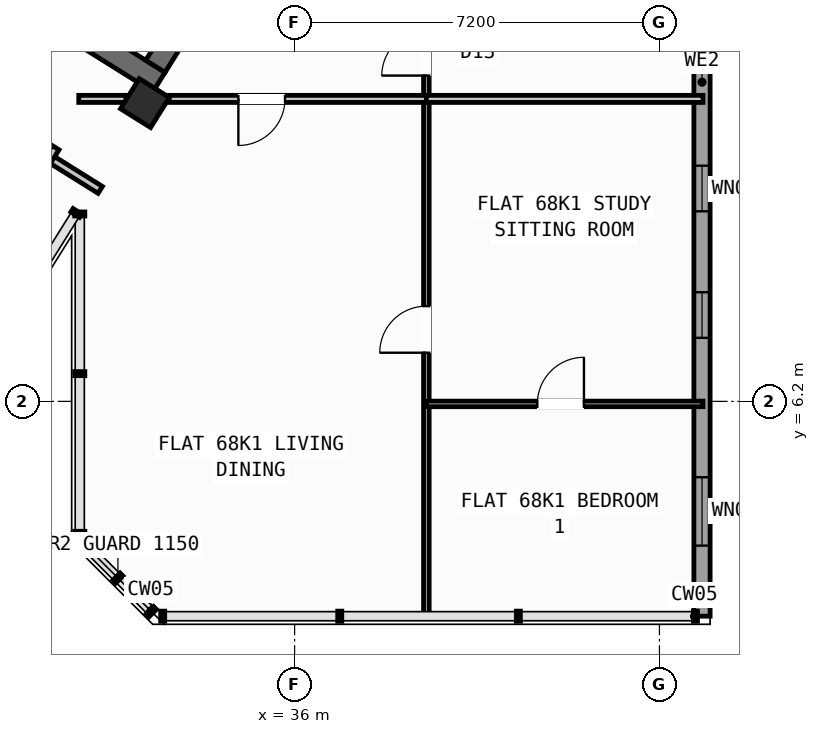
"""IFC4 building model, lengths in metres.
Left out: names, types, materials, properties, quantities, classifications, styles, units other than length and angle.
Written with IfcOpenShell. Run it as: python <this file> out.ifc"""

import sys

from ifc_helpers import new_model, si_unit, direction, frame, frame_2d, origin, origin_2d, place, context, subcontext, project, spatial, rectangle, hollow_rectangle, extrude, source, transform, mapped, element, fill, save


model = new_model("IFC4")
c1 = context("Model", 3, precision=1e-05, world=origin(), true_north=direction((0.0, 1.0)))
c2 = subcontext(c1, "Body", "Model", "MODEL_VIEW")
j1 = project(units=[si_unit("LENGTHUNIT", "METRE"), si_unit("PLANEANGLEUNIT", "RADIAN")], contexts=[c1])
p1 = place(None, origin())
s1 = spatial("IfcSite", under=j1, at=p1, CompositionType="ELEMENT")
p2 = place(p1, origin())
s2 = spatial("IfcBuilding", under=s1, at=p2, CompositionType="ELEMENT")
p3 = place(p2, frame((0.0, 0.0, 270.0)))
s3 = spatial("IfcBuildingStorey", under=s2, at=p3, CompositionType="ELEMENT", Elevation=270.0)
p4 = place(p3, frame((33.324, 12.503, 0.0), z_axis=(0.0, 0.0, 1.0), x_axis=(-0.848043529849, 0.529926571782, 0.0)))
e1 = element("IfcWall", 1, at=p4, inside=s3, PredefinedType="SHEAR", context=c2, shape_type="SweptSolid", body=[
    extrude(rectangle(XDim=13.04, YDim=0.45, at=frame_2d((6.52, 0.0))), origin(), (0.0, 0.0, 1.0), 3.35),
])
p5 = place(p3, frame((36.683, 18.304, 0.0), z_axis=(0.0, 0.0, 1.0), x_axis=(-0.529904039071, -0.848057609704, 0.0)))
e2 = element("IfcWall", 2, at=p5, inside=s3, PredefinedType="SHEAR", context=c2, shape_type="SweptSolid", body=[
    extrude(rectangle(XDim=6.475, YDim=0.45, at=frame_2d((3.238, 0.0))), origin(), (0.0, 0.0, 1.0), 3.35),
])
m1 = source(origin(), c2, "Body", "SweptSolid", [
    extrude(hollow_rectangle(XDim=0.7, YDim=0.7, WallThickness=0.028, at=origin_2d()), origin(), (0.0, 0.0, 1.0), 3.6),
])
p6 = place(p3, frame((33.046, 12.087, 0.0), z_axis=(0.0, 0.0, 1.0), x_axis=(-0.848048096156, 0.529919264233, 0.0)))
e3 = element("IfcColumn", 3, at=p6, inside=s3, PredefinedType="COLUMN", context=c2, shape_type="MappedRepresentation", body=[
    mapped(m1, transform((0.0, 0.0, 0.0), scale=1.0)),
])
p7 = place(p3, frame((44.04, 23.04, 0.0), z_axis=(0.0, 0.0, 1.0), x_axis=(0.0, -1.0, 0.0)))
e4 = element("IfcWall", 4, at=p7, inside=s3, PredefinedType="STANDARD", context=c2, shape_type="SweptSolid", body=[
    extrude(rectangle(XDim=21.08, YDim=0.32, at=frame_2d((10.54, 0.0))), origin(), (0.0, 0.0, 1.0), 3.35),
])
p8 = place(p7, frame((1.285, 0.0, 0.9)))
e5 = element("IfcOpeningElement", 5, at=p8, cuts=e4, PredefinedType="OPENING", context=c2, shape_type="SweptSolid", body=[
    extrude(rectangle(XDim=1.65, YDim=1.45, at=frame_2d((0.825, 0.725))), frame((0.0, 0.17, 0.0), z_axis=(0.0, -1.0, 0.0), x_axis=(1.0, 0.0, 0.0)), (0.0, 0.0, 1.0), 0.34),
])
p9 = place(p7, frame((4.605, 0.0, 0.9)))
e6 = element("IfcOpeningElement", 6, at=p9, cuts=e4, PredefinedType="OPENING", context=c2, shape_type="SweptSolid", body=[
    extrude(rectangle(XDim=1.65, YDim=1.45, at=frame_2d((0.825, 0.725))), frame((0.0, 0.17, 0.0), z_axis=(0.0, -1.0, 0.0), x_axis=(1.0, 0.0, 0.0)), (0.0, 0.0, 1.0), 0.34),
])
p10 = place(p7, frame((8.8, 0.0, 1.0)))
e7 = element("IfcOpeningElement", 7, at=p10, cuts=e4, PredefinedType="OPENING", context=c2, shape_type="SweptSolid", body=[
    extrude(rectangle(XDim=0.9, YDim=1.25, at=frame_2d((0.45, 0.625))), frame((0.0, 0.17, 0.0), z_axis=(0.0, -1.0, 0.0), x_axis=(1.0, 0.0, 0.0)), (0.0, 0.0, 1.0), 0.34),
])
p11 = place(p7, frame((12.189, 0.0, 1.0)))
e8 = element("IfcOpeningElement", 8, at=p11, cuts=e4, PredefinedType="OPENING", context=c2, shape_type="SweptSolid", body=[
    extrude(rectangle(XDim=0.9, YDim=1.25, at=frame_2d((0.45, 0.625))), frame((0.0, 0.17, 0.0), z_axis=(0.0, -1.0, 0.0), x_axis=(1.0, 0.0, 0.0)), (0.0, 0.0, 1.0), 0.34),
])
p12 = place(p7, frame((14.686, 0.0, 1.0)))
e9 = element("IfcOpeningElement", 9, at=p12, cuts=e4, PredefinedType="OPENING", context=c2, shape_type="SweptSolid", body=[
    extrude(rectangle(XDim=0.9, YDim=1.25, at=frame_2d((0.45, 0.625))), frame((0.0, 0.17, 0.0), z_axis=(0.0, -1.0, 0.0), x_axis=(1.0, 0.0, 0.0)), (0.0, 0.0, 1.0), 0.34),
])
p13 = place(p7, frame((18.337, 0.0, 0.9)))
e10 = element("IfcOpeningElement", 10, at=p13, cuts=e4, PredefinedType="OPENING", context=c2, shape_type="SweptSolid", body=[
    extrude(rectangle(XDim=1.35, YDim=1.45, at=frame_2d((0.675, 0.725))), frame((0.0, 0.17, 0.0), z_axis=(0.0, -1.0, 0.0), x_axis=(1.0, 0.0, 0.0)), (0.0, 0.0, 1.0), 0.34),
])
p14 = place(p3, frame((32.164, 10.374, 0.0), z_axis=(0.0, 0.0, 1.0), x_axis=(-0.848044107957, 0.529925646633, 0.0)))
e11 = element("IfcWall", 11, at=p14, inside=s3, PredefinedType="PARTITIONING", context=c2, shape_type="SweptSolid", body=[
    extrude(rectangle(XDim=15.57, YDim=0.16, at=frame_2d((7.785, 0.0))), origin(), (0.0, 0.0, 1.0), 3.34),
])
p15 = place(p14, frame((10.83, 0.0, 0.0)))
e12 = element("IfcOpeningElement", 12, at=p15, cuts=e11, PredefinedType="OPENING", context=c2, shape_type="SweptSolid", body=[
    extrude(rectangle(XDim=1.0, YDim=2.1, at=frame_2d((0.5, 1.05))), frame((0.0, 0.09, 0.0), z_axis=(0.0, -1.0, 0.0), x_axis=(1.0, 0.0, 0.0)), (0.0, 0.0, 1.0), 0.18),
])
p16 = place(p3, frame((31.282, 11.208, 0.0), z_axis=(0.0, 0.0, 1.0), x_axis=(-0.529938869374, -0.84803584519, 0.0)))
e13 = element("IfcWall", 13, at=p16, inside=s3, PredefinedType="PARTITIONING", context=c2, shape_type="SweptSolid", body=[
    extrude(rectangle(XDim=5.48, YDim=0.16, at=frame_2d((2.74, 0.0))), origin(), (0.0, 0.0, 1.0), 3.34),
])
p17 = place(p3, frame((38.6, 1.96, 0.0), z_axis=(0.0, 0.0, 1.0), x_axis=(0.0, 1.0, 0.0)))
e14 = element("IfcWall", 14, at=p17, inside=s3, PredefinedType="PARTITIONING", context=c2, shape_type="SweptSolid", body=[
    extrude(rectangle(XDim=13.46, YDim=0.11, at=frame_2d((6.73, 0.0))), origin(), (0.0, 0.0, 1.0), 3.34),
])
p18 = place(p17, frame((5.2, 0.0, 0.0)))
e15 = element("IfcOpeningElement", 15, at=p18, cuts=e14, PredefinedType="OPENING", context=c2, shape_type="SweptSolid", body=[
    extrude(rectangle(XDim=0.92, YDim=2.08, at=frame_2d((0.46, 1.04))), frame((0.0, 0.065, 0.0), z_axis=(0.0, -1.0, 0.0), x_axis=(1.0, 0.0, 0.0)), (0.0, 0.0, 1.0), 0.13),
])
p19 = place(p17, frame((10.67, 0.0, 0.0)))
e16 = element("IfcOpeningElement", 16, at=p19, cuts=e14, PredefinedType="OPENING", context=c2, shape_type="SweptSolid", body=[
    extrude(rectangle(XDim=0.88, YDim=2.08, at=frame_2d((0.44, 1.04))), frame((0.0, 0.065, 0.0), z_axis=(0.0, -1.0, 0.0), x_axis=(1.0, 0.0, 0.0)), (0.0, 0.0, 1.0), 0.13),
])
p20 = place(p3, frame((31.74, 12.17, 0.0), z_axis=(0.0, 0.0, 1.0), x_axis=(1.0, 0.0, 0.0)))
e17 = element("IfcWall", 17, at=p20, inside=s3, PredefinedType="PLUMBINGWALL", context=c2, shape_type="SweptSolid", body=[
    extrude(rectangle(XDim=0.931, YDim=0.14, at=frame_2d((0.466, 0.0))), origin(), (0.0, 0.0, 1.0), 3.34),
])
p21 = place(p3, frame((33.525, 12.17, 0.0), z_axis=(0.0, 0.0, 1.0), x_axis=(1.0, 0.0, 0.0)))
e18 = element("IfcWall", 18, at=p21, inside=s3, PredefinedType="PLUMBINGWALL", context=c2, shape_type="SweptSolid", body=[
    extrude(rectangle(XDim=5.075, YDim=0.14, at=frame_2d((2.538, 0.0))), origin(), (0.0, 0.0, 1.0), 3.34),
])
p22 = place(p21, frame((1.365, 0.0, 0.0)))
e19 = element("IfcOpeningElement", 19, at=p22, cuts=e18, PredefinedType="OPENING", context=c2, shape_type="SweptSolid", body=[
    extrude(rectangle(XDim=0.92, YDim=2.08, at=frame_2d((0.46, 1.04))), frame((0.0, 0.08, 0.0), z_axis=(0.0, -1.0, 0.0), x_axis=(1.0, 0.0, 0.0)), (0.0, 0.0, 1.0), 0.16),
])
p23 = place(p3, frame((38.6, 12.17, 0.0), z_axis=(0.0, 0.0, 1.0), x_axis=(1.0, 0.0, 0.0)))
e20 = element("IfcWall", 20, at=p23, inside=s3, PredefinedType="PLUMBINGWALL", context=c2, shape_type="SweptSolid", body=[
    extrude(rectangle(XDim=5.46, YDim=0.14, at=frame_2d((2.73, 0.0))), origin(), (0.0, 0.0, 1.0), 3.34),
])
p24 = place(p3, frame((38.6, 6.15, 0.0), z_axis=(0.0, 0.0, 1.0), x_axis=(1.0, 0.0, 0.0)))
e21 = element("IfcWall", 21, at=p24, inside=s3, PredefinedType="PARTITIONING", context=c2, shape_type="SweptSolid", body=[
    extrude(rectangle(XDim=5.46, YDim=0.11, at=frame_2d((2.73, 0.0))), origin(), (0.0, 0.0, 1.0), 3.34),
])
p25 = place(p24, frame((2.19, 0.0, 0.0)))
e22 = element("IfcOpeningElement", 22, at=p25, cuts=e21, PredefinedType="OPENING", context=c2, shape_type="SweptSolid", body=[
    extrude(rectangle(XDim=0.92, YDim=2.08, at=frame_2d((0.46, 1.04))), frame((0.0, 0.065, 0.0), z_axis=(0.0, -1.0, 0.0), x_axis=(1.0, 0.0, 0.0)), (0.0, 0.0, 1.0), 0.13),
])
m2 = source(origin(), c2, "Body", "SweptSolid", [
    extrude(rectangle(XDim=0.9, YDim=1.25, at=frame_2d((0.45, 0.625))), frame((0.0, 0.03, 0.0), z_axis=(0.0, -1.0, 0.0), x_axis=(1.0, 0.0, 0.0)), (0.0, 0.0, 1.0), 0.06),
])
p26 = place(p11, origin())
e23 = element("IfcWindow", 23, at=p26, inside=s3, PartitioningType="SINGLE_PANEL", PredefinedType="WINDOW", context=c2, shape_type="MappedRepresentation", body=[
    mapped(m2, transform((0.0, 0.0, 0.0), scale=1.0)),
])
fill(e8, e23)
p27 = place(p12, origin())
e24 = element("IfcWindow", 24, at=p27, inside=s3, PartitioningType="SINGLE_PANEL", PredefinedType="WINDOW", context=c2, shape_type="MappedRepresentation", body=[
    mapped(m2, transform((0.0, 0.0, 0.0), scale=1.0)),
])
fill(e9, e24)
m3 = source(origin(), c2, "Body", "SweptSolid", [
    extrude(rectangle(XDim=1.35, YDim=1.45, at=frame_2d((0.675, 0.725))), frame((0.0, 0.03, 0.0), z_axis=(0.0, -1.0, 0.0), x_axis=(1.0, 0.0, 0.0)), (0.0, 0.0, 1.0), 0.06),
])
p28 = place(p13, origin())
e25 = element("IfcWindow", 25, at=p28, inside=s3, PartitioningType="SINGLE_PANEL", PredefinedType="WINDOW", context=c2, shape_type="MappedRepresentation", body=[
    mapped(m3, transform((0.0, 0.0, 0.0), scale=1.0)),
])
fill(e10, e25)
m4 = source(origin(), c2, "Body", "SweptSolid", [
    extrude(rectangle(XDim=0.92, YDim=2.08, at=frame_2d((0.46, 1.04))), frame((0.0, 0.025, 0.0), z_axis=(0.0, -1.0, 0.0), x_axis=(1.0, 0.0, 0.0)), (0.0, 0.0, 1.0), 0.05),
])
p29 = place(p18, origin())
e26 = element("IfcDoor", 26, at=p29, inside=s3, OperationType="SINGLE_SWING_LEFT", PredefinedType="DOOR", context=c2, shape_type="MappedRepresentation", body=[
    mapped(m4, transform((0.0, 0.0, 0.0), scale=1.0)),
])
fill(e15, e26)
p30 = place(p25, origin())
e27 = element("IfcDoor", 27, at=p30, inside=s3, OperationType="SINGLE_SWING_RIGHT", PredefinedType="DOOR", context=c2, shape_type="MappedRepresentation", body=[
    mapped(m4, transform((0.0, 0.0, 0.0), scale=1.0)),
])
fill(e22, e27)
p31 = place(p22, frame((0.92, 0.0, 0.0), z_axis=(0.0, 0.0, 1.0), x_axis=(-1.0, 0.0, 0.0)))
e28 = element("IfcDoor", 28, at=p31, inside=s3, OperationType="SINGLE_SWING_RIGHT", PredefinedType="DOOR", context=c2, shape_type="MappedRepresentation", body=[
    mapped(m4, transform((0.0, 0.0, 0.0), scale=1.0)),
])
fill(e19, e28)
m5 = source(origin(), c2, "Body", "SweptSolid", [
    extrude(rectangle(XDim=0.88, YDim=2.08, at=frame_2d((0.44, 1.04))), frame((0.0, 0.025, 0.0), z_axis=(0.0, -1.0, 0.0), x_axis=(1.0, 0.0, 0.0)), (0.0, 0.0, 1.0), 0.05),
])
p32 = place(p19, origin())
e29 = element("IfcDoor", 29, at=p32, inside=s3, OperationType="SINGLE_SWING_LEFT", PredefinedType="DOOR", context=c2, shape_type="MappedRepresentation", body=[
    mapped(m5, transform((0.0, 0.0, 0.0), scale=1.0)),
])
fill(e16, e29)
save(model, sys.argv[1])
